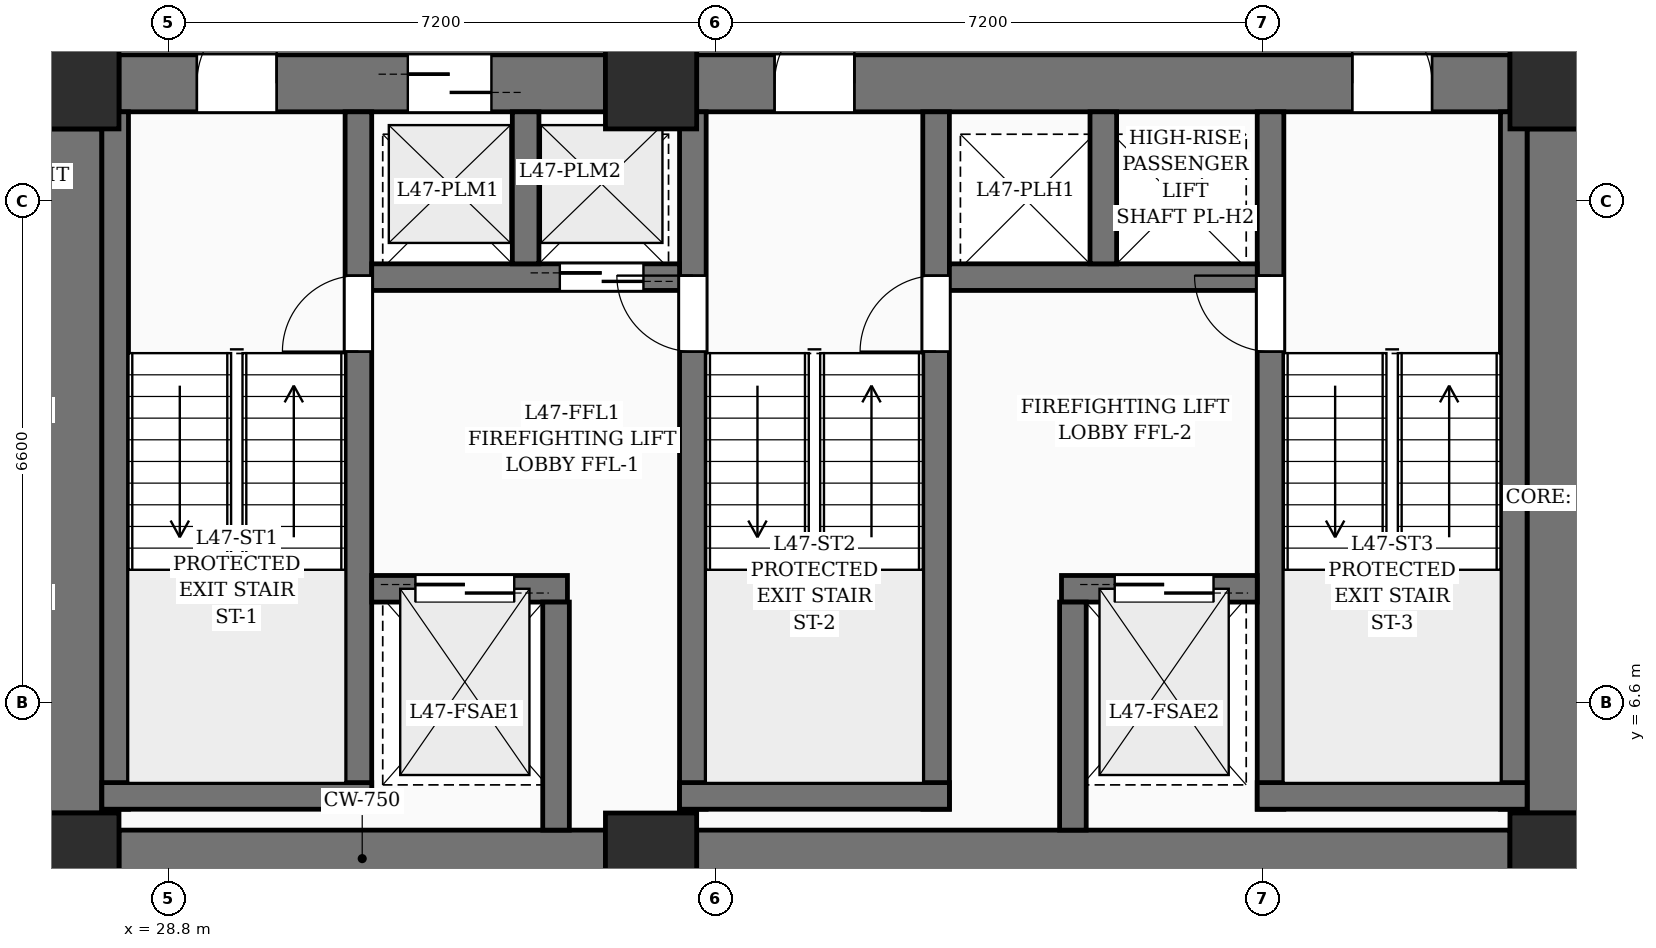
"""IFC4 building model, lengths in metres.
Left out: names, types, materials, properties, quantities, classifications, styles, units other than length and angle.
Written with IfcOpenShell. Run it as: python <this file> out.ifc"""

import sys

from ifc_helpers import new_model, si_unit, direction, frame, frame_2d, origin, origin_2d, place, context, subcontext, project, spatial, rectangle, extrude, element, fill, save


model = new_model("IFC4")
c1 = context("Model", 3, precision=1e-05, world=origin(), true_north=direction((0.0, 1.0)))
c2 = subcontext(c1, "Body", "Model", "MODEL_VIEW")
j1 = project(units=[si_unit("LENGTHUNIT", "METRE"), si_unit("PLANEANGLEUNIT", "RADIAN")], contexts=[c1])
p1 = place(None, origin())
s1 = spatial("IfcSite", under=j1, at=p1, CompositionType="ELEMENT")
p2 = place(p1, origin())
s2 = spatial("IfcBuilding", under=s1, at=p2, CompositionType="ELEMENT")
p3 = place(p2, frame((0.0, 0.0, 182.4)))
s3 = spatial("IfcBuildingStorey", under=s2, at=p3, CompositionType="ELEMENT", Elevation=182.4)
for number, where, z_axis, x_axis in (
    (1, (27.55, 4.55, 0.0), (0.0, 0.0, 1.0), (1.0, 0.0, 0.0)),
    (2, (35.15, 4.55, 0.0), (0.0, 0.0, 1.0), (1.0, 0.0, 0.0)),
    (3, (47.05, 4.55, 0.0), (0.0, 0.0, 1.0), (1.0, 0.0, 0.0)),
    (4, (27.55, 14.75, 0.0), (0.0, 0.0, 1.0), (1.0, 0.0, 0.0)),
    (5, (35.15, 14.75, 0.0), (0.0, 0.0, 1.0), (1.0, 0.0, 0.0)),
    (6, (47.05, 14.75, 0.0), (0.0, 0.0, 1.0), (1.0, 0.0, 0.0)),
):
    element("IfcColumn", number, at=place(p3, frame(where, z_axis=z_axis, x_axis=x_axis)), inside=s3, PredefinedType="COLUMN", context=c2, shape_type="SweptSolid", body=[
        extrude(rectangle(XDim=1.2, YDim=1.2, at=origin_2d()), origin(), (0.0, 0.0, 1.0), 3.6),
    ])
p4 = place(p3, frame((28.15, 4.55, 0.0), z_axis=(0.0, 0.0, 1.0), x_axis=(1.0, 0.0, 0.0)))
e7 = element("IfcWall", 7, at=p4, inside=s3, PredefinedType="SHEAR", context=c2, shape_type="SweptSolid", body=[
    extrude(rectangle(XDim=6.4, YDim=0.75, at=frame_2d((3.2, 0.0))), origin(), (0.0, 0.0, 1.0), 3.6),
])
p5 = place(p3, frame((35.75, 4.55, 0.0), z_axis=(0.0, 0.0, 1.0), x_axis=(1.0, 0.0, 0.0)))
e8 = element("IfcWall", 8, at=p5, inside=s3, PredefinedType="SHEAR", context=c2, shape_type="SweptSolid", body=[
    extrude(rectangle(XDim=10.7, YDim=0.75, at=frame_2d((5.35, 0.0))), origin(), (0.0, 0.0, 1.0), 3.6),
])
p6 = place(p3, frame((28.15, 14.75, 0.0), z_axis=(0.0, 0.0, 1.0), x_axis=(1.0, 0.0, 0.0)))
e9 = element("IfcWall", 9, at=p6, inside=s3, PredefinedType="SHEAR", context=c2, shape_type="SweptSolid", body=[
    extrude(rectangle(XDim=6.4, YDim=0.75, at=frame_2d((3.2, 0.0))), origin(), (0.0, 0.0, 1.0), 3.6),
])
p7 = place(p6, frame((1.025, 0.0, 0.0)))
e10 = element("IfcOpeningElement", 10, at=p7, cuts=e9, PredefinedType="OPENING", context=c2, shape_type="SweptSolid", body=[
    extrude(rectangle(XDim=1.05, YDim=2.15, at=frame_2d((0.525, 1.075))), frame((0.0, 0.385, 0.0), z_axis=(0.0, -1.0, 0.0), x_axis=(1.0, 0.0, 0.0)), (0.0, 0.0, 1.0), 0.77),
])
p8 = place(p6, frame((3.8, 0.0, 0.0)))
e11 = element("IfcOpeningElement", 11, at=p8, cuts=e9, PredefinedType="OPENING", context=c2, shape_type="SweptSolid", body=[
    extrude(rectangle(XDim=1.1, YDim=2.2, at=frame_2d((0.55, 1.1))), frame((0.0, 0.385, 0.0), z_axis=(0.0, -1.0, 0.0), x_axis=(1.0, 0.0, 0.0)), (0.0, 0.0, 1.0), 0.77),
])
p9 = place(p3, frame((35.75, 14.75, 0.0), z_axis=(0.0, 0.0, 1.0), x_axis=(1.0, 0.0, 0.0)))
e12 = element("IfcWall", 12, at=p9, inside=s3, PredefinedType="SHEAR", context=c2, shape_type="SweptSolid", body=[
    extrude(rectangle(XDim=10.7, YDim=0.75, at=frame_2d((5.35, 0.0))), origin(), (0.0, 0.0, 1.0), 3.6),
])
p10 = place(p9, frame((1.025, 0.0, 0.0)))
e13 = element("IfcOpeningElement", 13, at=p10, cuts=e12, PredefinedType="OPENING", context=c2, shape_type="SweptSolid", body=[
    extrude(rectangle(XDim=1.05, YDim=2.15, at=frame_2d((0.525, 1.075))), frame((0.0, 0.385, 0.0), z_axis=(0.0, -1.0, 0.0), x_axis=(1.0, 0.0, 0.0)), (0.0, 0.0, 1.0), 0.77),
])
p11 = place(p9, frame((8.625, 0.0, 0.0)))
e14 = element("IfcOpeningElement", 14, at=p11, cuts=e12, PredefinedType="OPENING", context=c2, shape_type="SweptSolid", body=[
    extrude(rectangle(XDim=1.05, YDim=2.15, at=frame_2d((0.525, 1.075))), frame((0.0, 0.385, 0.0), z_axis=(0.0, -1.0, 0.0), x_axis=(1.0, 0.0, 0.0)), (0.0, 0.0, 1.0), 0.77),
])
for number, where, z_axis, x_axis in (
    (15, (27.55, 5.15, 0.0), (0.0, 0.0, 1.0), (0.0, 1.0, 0.0)),
    (16, (47.05, 5.15, 0.0), (0.0, 0.0, 1.0), (0.0, 1.0, 0.0)),
):
    element("IfcWall", number, at=place(p3, frame(where, z_axis=z_axis, x_axis=x_axis)), inside=s3, PredefinedType="SHEAR", context=c2, shape_type="SweptSolid", body=[
        extrude(rectangle(XDim=9.0, YDim=0.75, at=frame_2d((4.5, 0.0))), origin(), (0.0, 0.0, 1.0), 3.6),
    ])
p12 = place(p3, frame((28.1, 5.2, 0.0), z_axis=(0.0, 0.0, 1.0), x_axis=(0.0, 1.0, 0.0)))
e17 = element("IfcWall", 17, at=p12, inside=s3, PredefinedType="SOLIDWALL", context=c2, shape_type="SweptSolid", body=[
    extrude(rectangle(XDim=9.175, YDim=0.35, at=frame_2d((4.587, 0.0))), origin(), (0.0, 0.0, 1.0), 3.6),
])
p13 = place(p3, frame((31.3, 5.2, 0.0), z_axis=(0.0, 0.0, 1.0), x_axis=(0.0, 1.0, 0.0)))
e18 = element("IfcWall", 18, at=p13, inside=s3, PredefinedType="SOLIDWALL", context=c2, shape_type="SweptSolid", body=[
    extrude(rectangle(XDim=9.175, YDim=0.35, at=frame_2d((4.587, 0.0))), origin(), (0.0, 0.0, 1.0), 3.6),
])
p14 = place(p13, frame((6.02, 0.0, 0.0)))
e19 = element("IfcOpeningElement", 19, at=p14, cuts=e18, PredefinedType="OPENING", context=c2, shape_type="SweptSolid", body=[
    extrude(rectangle(XDim=1.0, YDim=2.15, at=frame_2d((0.5, 1.075))), frame((0.0, 0.185, 0.0), z_axis=(0.0, -1.0, 0.0), x_axis=(1.0, 0.0, 0.0)), (0.0, 0.0, 1.0), 0.37),
])
p15 = place(p3, frame((27.925, 5.375, 0.0), z_axis=(0.0, 0.0, 1.0), x_axis=(1.0, 0.0, 0.0)))
e20 = element("IfcWall", 20, at=p15, inside=s3, PredefinedType="SOLIDWALL", context=c2, shape_type="SweptSolid", body=[
    extrude(rectangle(XDim=3.55, YDim=0.35, at=frame_2d((1.775, 0.0))), origin(), (0.0, 0.0, 1.0), 3.6),
])
p16 = place(p3, frame((35.7, 5.2, 0.0), z_axis=(0.0, 0.0, 1.0), x_axis=(0.0, 1.0, 0.0)))
e21 = element("IfcWall", 21, at=p16, inside=s3, PredefinedType="SOLIDWALL", context=c2, shape_type="SweptSolid", body=[
    extrude(rectangle(XDim=9.175, YDim=0.35, at=frame_2d((4.587, 0.0))), origin(), (0.0, 0.0, 1.0), 3.6),
])
p17 = place(p16, frame((6.02, 0.0, 0.0)))
e22 = element("IfcOpeningElement", 22, at=p17, cuts=e21, PredefinedType="OPENING", context=c2, shape_type="SweptSolid", body=[
    extrude(rectangle(XDim=1.0, YDim=2.15, at=frame_2d((0.5, 1.075))), frame((0.0, 0.185, 0.0), z_axis=(0.0, -1.0, 0.0), x_axis=(1.0, 0.0, 0.0)), (0.0, 0.0, 1.0), 0.37),
])
p18 = place(p3, frame((38.9, 5.2, 0.0), z_axis=(0.0, 0.0, 1.0), x_axis=(0.0, 1.0, 0.0)))
e23 = element("IfcWall", 23, at=p18, inside=s3, PredefinedType="SOLIDWALL", context=c2, shape_type="SweptSolid", body=[
    extrude(rectangle(XDim=9.175, YDim=0.35, at=frame_2d((4.587, 0.0))), origin(), (0.0, 0.0, 1.0), 3.6),
])
p19 = place(p18, frame((6.02, 0.0, 0.0)))
e24 = element("IfcOpeningElement", 24, at=p19, cuts=e23, PredefinedType="OPENING", context=c2, shape_type="SweptSolid", body=[
    extrude(rectangle(XDim=1.0, YDim=2.15, at=frame_2d((0.5, 1.075))), frame((0.0, 0.185, 0.0), z_axis=(0.0, -1.0, 0.0), x_axis=(1.0, 0.0, 0.0)), (0.0, 0.0, 1.0), 0.37),
])
p20 = place(p3, frame((35.525, 5.375, 0.0), z_axis=(0.0, 0.0, 1.0), x_axis=(1.0, 0.0, 0.0)))
e25 = element("IfcWall", 25, at=p20, inside=s3, PredefinedType="SOLIDWALL", context=c2, shape_type="SweptSolid", body=[
    extrude(rectangle(XDim=3.55, YDim=0.35, at=frame_2d((1.775, 0.0))), origin(), (0.0, 0.0, 1.0), 3.6),
])
p21 = place(p3, frame((43.3, 5.2, 0.0), z_axis=(0.0, 0.0, 1.0), x_axis=(0.0, 1.0, 0.0)))
e26 = element("IfcWall", 26, at=p21, inside=s3, PredefinedType="SOLIDWALL", context=c2, shape_type="SweptSolid", body=[
    extrude(rectangle(XDim=9.175, YDim=0.35, at=frame_2d((4.587, 0.0))), origin(), (0.0, 0.0, 1.0), 3.6),
])
p22 = place(p21, frame((6.02, 0.0, 0.0)))
e27 = element("IfcOpeningElement", 27, at=p22, cuts=e26, PredefinedType="OPENING", context=c2, shape_type="SweptSolid", body=[
    extrude(rectangle(XDim=1.0, YDim=2.15, at=frame_2d((0.5, 1.075))), frame((0.0, 0.185, 0.0), z_axis=(0.0, -1.0, 0.0), x_axis=(1.0, 0.0, 0.0)), (0.0, 0.0, 1.0), 0.37),
])
p23 = place(p3, frame((46.5, 5.2, 0.0), z_axis=(0.0, 0.0, 1.0), x_axis=(0.0, 1.0, 0.0)))
e28 = element("IfcWall", 28, at=p23, inside=s3, PredefinedType="SOLIDWALL", context=c2, shape_type="SweptSolid", body=[
    extrude(rectangle(XDim=9.175, YDim=0.35, at=frame_2d((4.587, 0.0))), origin(), (0.0, 0.0, 1.0), 3.6),
])
p24 = place(p3, frame((43.125, 5.375, 0.0), z_axis=(0.0, 0.0, 1.0), x_axis=(1.0, 0.0, 0.0)))
e29 = element("IfcWall", 29, at=p24, inside=s3, PredefinedType="SOLIDWALL", context=c2, shape_type="SweptSolid", body=[
    extrude(rectangle(XDim=3.55, YDim=0.35, at=frame_2d((1.775, 0.0))), origin(), (0.0, 0.0, 1.0), 3.6),
])
p25 = place(p3, frame((31.475, 8.1, 0.0), z_axis=(0.0, 0.0, 1.0), x_axis=(1.0, 0.0, 0.0)))
e30 = element("IfcWall", 30, at=p25, inside=s3, PredefinedType="SOLIDWALL", context=c2, shape_type="SweptSolid", body=[
    extrude(rectangle(XDim=2.575, YDim=0.35, at=frame_2d((1.288, 0.0))), origin(), (0.0, 0.0, 1.0), 3.6),
])
p26 = place(p25, frame((0.575, 0.0, 0.0)))
e31 = element("IfcOpeningElement", 31, at=p26, cuts=e30, PredefinedType="OPENING", context=c2, shape_type="SweptSolid", body=[
    extrude(rectangle(XDim=1.3, YDim=2.25, at=frame_2d((0.65, 1.125))), frame((0.0, 0.185, 0.0), z_axis=(0.0, -1.0, 0.0), x_axis=(1.0, 0.0, 0.0)), (0.0, 0.0, 1.0), 0.37),
])
p27 = place(p3, frame((40.55, 8.1, 0.0), z_axis=(0.0, 0.0, 1.0), x_axis=(1.0, 0.0, 0.0)))
e32 = element("IfcWall", 32, at=p27, inside=s3, PredefinedType="SOLIDWALL", context=c2, shape_type="SweptSolid", body=[
    extrude(rectangle(XDim=2.575, YDim=0.35, at=frame_2d((1.288, 0.0))), origin(), (0.0, 0.0, 1.0), 3.6),
])
p28 = place(p27, frame((0.7, 0.0, 0.0)))
e33 = element("IfcOpeningElement", 33, at=p28, cuts=e32, PredefinedType="OPENING", context=c2, shape_type="SweptSolid", body=[
    extrude(rectangle(XDim=1.3, YDim=2.25, at=frame_2d((0.65, 1.125))), frame((0.0, 0.185, 0.0), z_axis=(0.0, -1.0, 0.0), x_axis=(1.0, 0.0, 0.0)), (0.0, 0.0, 1.0), 0.37),
])
for number, where, z_axis, x_axis in (
    (34, (33.9, 4.925, 0.0), (0.0, 0.0, 1.0), (0.0, 1.0, 0.0)),
    (35, (40.7, 4.925, 0.0), (0.0, 0.0, 1.0), (0.0, 1.0, 0.0)),
):
    element("IfcWall", number, at=place(p3, frame(where, z_axis=z_axis, x_axis=x_axis)), inside=s3, PredefinedType="SOLIDWALL", context=c2, shape_type="SweptSolid", body=[
        extrude(rectangle(XDim=3.0, YDim=0.35, at=frame_2d((1.5, 0.0))), origin(), (0.0, 0.0, 1.0), 3.6),
    ])
p29 = place(p3, frame((31.475, 12.2, 0.0), z_axis=(0.0, 0.0, 1.0), x_axis=(1.0, 0.0, 0.0)))
e36 = element("IfcWall", 36, at=p29, inside=s3, PredefinedType="SOLIDWALL", context=c2, shape_type="SweptSolid", body=[
    extrude(rectangle(XDim=4.05, YDim=0.35, at=frame_2d((2.025, 0.0))), origin(), (0.0, 0.0, 1.0), 3.6),
])
p30 = place(p29, frame((2.475, 0.0, 0.0)))
e37 = element("IfcOpeningElement", 37, at=p30, cuts=e36, PredefinedType="OPENING", context=c2, shape_type="SweptSolid", body=[
    extrude(rectangle(XDim=1.1, YDim=2.2, at=frame_2d((0.55, 1.1))), frame((0.0, 0.185, 0.0), z_axis=(0.0, -1.0, 0.0), x_axis=(1.0, 0.0, 0.0)), (0.0, 0.0, 1.0), 0.37),
])
p31 = place(p3, frame((33.5, 12.375, 0.0), z_axis=(0.0, 0.0, 1.0), x_axis=(0.0, 1.0, 0.0)))
e38 = element("IfcWall", 38, at=p31, inside=s3, PredefinedType="SOLIDWALL", context=c2, shape_type="SweptSolid", body=[
    extrude(rectangle(XDim=2.0, YDim=0.35, at=frame_2d((1.0, 0.0))), origin(), (0.0, 0.0, 1.0), 3.6),
])
p32 = place(p3, frame((39.075, 12.2, 0.0), z_axis=(0.0, 0.0, 1.0), x_axis=(1.0, 0.0, 0.0)))
e39 = element("IfcWall", 39, at=p32, inside=s3, PredefinedType="SOLIDWALL", context=c2, shape_type="SweptSolid", body=[
    extrude(rectangle(XDim=4.05, YDim=0.35, at=frame_2d((2.025, 0.0))), origin(), (0.0, 0.0, 1.0), 3.6),
])
p33 = place(p3, frame((41.1, 12.375, 0.0), z_axis=(0.0, 0.0, 1.0), x_axis=(0.0, 1.0, 0.0)))
e40 = element("IfcWall", 40, at=p33, inside=s3, PredefinedType="SOLIDWALL", context=c2, shape_type="SweptSolid", body=[
    extrude(rectangle(XDim=2.0, YDim=0.35, at=frame_2d((1.0, 0.0))), origin(), (0.0, 0.0, 1.0), 3.6),
])
p34 = place(p7, origin())
e41 = element("IfcDoor", 41, at=p34, inside=s3, OperationType="SINGLE_SWING_RIGHT", PredefinedType="DOOR", context=c2, shape_type="SweptSolid", body=[
    extrude(rectangle(XDim=1.05, YDim=2.15, at=frame_2d((0.525, 1.075))), frame((0.0, 0.025, 0.0), z_axis=(0.0, -1.0, 0.0), x_axis=(1.0, 0.0, 0.0)), (0.0, 0.0, 1.0), 0.05),
])
fill(e10, e41)
p35 = place(p10, origin())
e42 = element("IfcDoor", 42, at=p35, inside=s3, OperationType="SINGLE_SWING_RIGHT", PredefinedType="DOOR", context=c2, shape_type="SweptSolid", body=[
    extrude(rectangle(XDim=1.05, YDim=2.15, at=frame_2d((0.525, 1.075))), frame((0.0, 0.025, 0.0), z_axis=(0.0, -1.0, 0.0), x_axis=(1.0, 0.0, 0.0)), (0.0, 0.0, 1.0), 0.05),
])
fill(e13, e42)
p36 = place(p11, origin())
e43 = element("IfcDoor", 43, at=p36, inside=s3, OperationType="SINGLE_SWING_LEFT", PredefinedType="DOOR", context=c2, shape_type="SweptSolid", body=[
    extrude(rectangle(XDim=1.05, YDim=2.15, at=frame_2d((0.525, 1.075))), frame((0.0, 0.025, 0.0), z_axis=(0.0, -1.0, 0.0), x_axis=(1.0, 0.0, 0.0)), (0.0, 0.0, 1.0), 0.05),
])
fill(e14, e43)
p37 = place(p14, origin())
e44 = element("IfcDoor", 44, at=p37, inside=s3, OperationType="SINGLE_SWING_LEFT", PredefinedType="DOOR", context=c2, shape_type="SweptSolid", body=[
    extrude(rectangle(XDim=1.0, YDim=2.15, at=frame_2d((0.5, 1.075))), frame((0.0, 0.025, 0.0), z_axis=(0.0, -1.0, 0.0), x_axis=(1.0, 0.0, 0.0)), (0.0, 0.0, 1.0), 0.05),
])
fill(e19, e44)
p38 = place(p17, origin())
e45 = element("IfcDoor", 45, at=p38, inside=s3, OperationType="SINGLE_SWING_RIGHT", PredefinedType="DOOR", context=c2, shape_type="SweptSolid", body=[
    extrude(rectangle(XDim=1.0, YDim=2.15, at=frame_2d((0.5, 1.075))), frame((0.0, 0.025, 0.0), z_axis=(0.0, -1.0, 0.0), x_axis=(1.0, 0.0, 0.0)), (0.0, 0.0, 1.0), 0.05),
])
fill(e22, e45)
p39 = place(p19, origin())
e46 = element("IfcDoor", 46, at=p39, inside=s3, OperationType="SINGLE_SWING_LEFT", PredefinedType="DOOR", context=c2, shape_type="SweptSolid", body=[
    extrude(rectangle(XDim=1.0, YDim=2.15, at=frame_2d((0.5, 1.075))), frame((0.0, 0.025, 0.0), z_axis=(0.0, -1.0, 0.0), x_axis=(1.0, 0.0, 0.0)), (0.0, 0.0, 1.0), 0.05),
])
fill(e24, e46)
p40 = place(p22, origin())
e47 = element("IfcDoor", 47, at=p40, inside=s3, OperationType="SINGLE_SWING_RIGHT", PredefinedType="DOOR", context=c2, shape_type="SweptSolid", body=[
    extrude(rectangle(XDim=1.0, YDim=2.15, at=frame_2d((0.5, 1.075))), frame((0.0, 0.025, 0.0), z_axis=(0.0, -1.0, 0.0), x_axis=(1.0, 0.0, 0.0)), (0.0, 0.0, 1.0), 0.05),
])
fill(e27, e47)
p41 = place(p26, origin())
e48 = element("IfcDoor", 48, at=p41, inside=s3, OperationType="DOUBLE_DOOR_SLIDING", PredefinedType="DOOR", context=c2, shape_type="SweptSolid", body=[
    extrude(rectangle(XDim=1.3, YDim=2.25, at=frame_2d((0.65, 1.125))), frame((0.0, 0.025, 0.0), z_axis=(0.0, -1.0, 0.0), x_axis=(1.0, 0.0, 0.0)), (0.0, 0.0, 1.0), 0.05),
])
fill(e31, e48)
p42 = place(p28, origin())
e49 = element("IfcDoor", 49, at=p42, inside=s3, OperationType="DOUBLE_DOOR_SLIDING", PredefinedType="DOOR", context=c2, shape_type="SweptSolid", body=[
    extrude(rectangle(XDim=1.3, YDim=2.25, at=frame_2d((0.65, 1.125))), frame((0.0, 0.025, 0.0), z_axis=(0.0, -1.0, 0.0), x_axis=(1.0, 0.0, 0.0)), (0.0, 0.0, 1.0), 0.05),
])
fill(e33, e49)
p43 = place(p8, origin())
e50 = element("IfcDoor", 50, at=p43, inside=s3, OperationType="DOUBLE_DOOR_SLIDING", PredefinedType="DOOR", context=c2, shape_type="SweptSolid", body=[
    extrude(rectangle(XDim=1.1, YDim=2.2, at=frame_2d((0.55, 1.1))), frame((0.0, 0.025, 0.0), z_axis=(0.0, -1.0, 0.0), x_axis=(1.0, 0.0, 0.0)), (0.0, 0.0, 1.0), 0.05),
])
fill(e11, e50)
p44 = place(p30, origin())
e51 = element("IfcDoor", 51, at=p44, inside=s3, OperationType="DOUBLE_DOOR_SLIDING", PredefinedType="DOOR", context=c2, shape_type="SweptSolid", body=[
    extrude(rectangle(XDim=1.1, YDim=2.2, at=frame_2d((0.55, 1.1))), frame((0.0, 0.025, 0.0), z_axis=(0.0, -1.0, 0.0), x_axis=(1.0, 0.0, 0.0)), (0.0, 0.0, 1.0), 0.05),
])
fill(e37, e51)
save(model, sys.argv[1])
